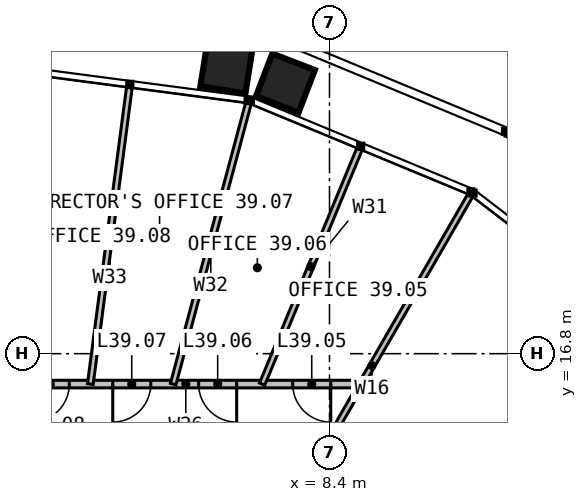
"""IFC4 building model, lengths in metres.
Left out: names, types, materials, properties, quantities, classifications, styles, units other than length and angle.
Written with IfcOpenShell. Run it as: python <this file> out.ifc"""

import sys

from ifc_helpers import new_model, si_unit, direction, frame, frame_2d, origin, place, context, subcontext, project, spatial, rectangle, extrude, element, fill, save


model = new_model("IFC4")
c1 = context("Model", 3, precision=1e-05, world=origin(), true_north=direction((0.0, 1.0)))
c2 = subcontext(c1, "Body", "Model", "MODEL_VIEW")
j1 = project(units=[si_unit("LENGTHUNIT", "METRE"), si_unit("PLANEANGLEUNIT", "RADIAN")], contexts=[c1])
p1 = place(None, origin())
s1 = spatial("IfcSite", under=j1, at=p1, CompositionType="ELEMENT")
p2 = place(p1, origin())
s2 = spatial("IfcBuilding", under=s1, at=p2, CompositionType="ELEMENT")
p3 = place(p2, frame((0.0, 0.0, 163.0)))
s3 = spatial("IfcBuildingStorey", under=s2, at=p3, CompositionType="ELEMENT", Elevation=163.0)
p4 = place(p3, frame((6.928, 12.0, 0.0), z_axis=(0.0, 0.0, 1.0), x_axis=(0.500006140648, 0.86602185845, 0.0)))
e1 = element("IfcWall", 1, at=p4, inside=s3, PredefinedType="PARTITIONING", context=c2, shape_type="SweptSolid", body=[
    extrude(rectangle(XDim=10.355, YDim=0.15, at=frame_2d((5.177, 0.0))), origin(), (0.0, 0.0, 1.0), 2.79),
])
p5 = place(p3, frame((9.238, 16.0, 0.0), z_axis=(0.0, 0.0, 1.0), x_axis=(-1.0, 0.0, 0.0)))
e2 = element("IfcWall", 2, at=p5, inside=s3, PredefinedType="PARTITIONING", context=c2, shape_type="SweptSolid", body=[
    extrude(rectangle(XDim=9.238, YDim=0.2, at=frame_2d((4.619, 0.0))), origin(), (0.0, 0.0, 1.0), 3.8),
])
p6 = place(p5, frame((0.805, 0.0, 0.0)))
e3 = element("IfcOpeningElement", 3, at=p6, cuts=e2, PredefinedType="OPENING", context=c2, shape_type="SweptSolid", body=[
    extrude(rectangle(XDim=1.0, YDim=2.2, at=frame_2d((0.5, 1.1))), frame((0.0, 0.11, 0.0), z_axis=(0.0, -1.0, 0.0), x_axis=(1.0, 0.0, 0.0)), (0.0, 0.0, 1.0), 0.22),
])
p7 = place(p5, frame((3.28, 0.0, 0.0)))
e4 = element("IfcOpeningElement", 4, at=p7, cuts=e2, PredefinedType="OPENING", context=c2, shape_type="SweptSolid", body=[
    extrude(rectangle(XDim=1.0, YDim=2.2, at=frame_2d((0.5, 1.1))), frame((0.0, 0.11, 0.0), z_axis=(0.0, -1.0, 0.0), x_axis=(1.0, 0.0, 0.0)), (0.0, 0.0, 1.0), 0.22),
])
p8 = place(p5, frame((5.541, 0.0, 0.0)))
e5 = element("IfcOpeningElement", 5, at=p8, cuts=e2, PredefinedType="OPENING", context=c2, shape_type="SweptSolid", body=[
    extrude(rectangle(XDim=1.0, YDim=2.2, at=frame_2d((0.5, 1.1))), frame((0.0, 0.11, 0.0), z_axis=(0.0, -1.0, 0.0), x_axis=(1.0, 0.0, 0.0)), (0.0, 0.0, 1.0), 0.22),
])
p9 = place(p5, frame((7.684, 0.0, 0.0)))
e6 = element("IfcOpeningElement", 6, at=p9, cuts=e2, PredefinedType="OPENING", context=c2, shape_type="SweptSolid", body=[
    extrude(rectangle(XDim=1.0, YDim=2.2, at=frame_2d((0.5, 1.1))), frame((0.0, 0.11, 0.0), z_axis=(0.0, -1.0, 0.0), x_axis=(1.0, 0.0, 0.0)), (0.0, 0.0, 1.0), 0.22),
])
p10 = place(p3, frame((6.627, 16.0, 0.0), z_axis=(0.0, 0.0, 1.0), x_axis=(0.382682891863, 0.923879756395, 0.0)))
e7 = element("IfcWall", 7, at=p10, inside=s3, PredefinedType="PARTITIONING", context=c2, shape_type="SweptSolid", body=[
    extrude(rectangle(XDim=6.686, YDim=0.15, at=frame_2d((3.343, 0.0))), origin(), (0.0, 0.0, 1.0), 2.79),
])
p11 = place(p3, frame((4.287, 16.0, 0.0), z_axis=(0.0, 0.0, 1.0), x_axis=(0.25883290061, 0.965922113611, 0.0)))
e8 = element("IfcWall", 8, at=p11, inside=s3, PredefinedType="PARTITIONING", context=c2, shape_type="SweptSolid", body=[
    extrude(rectangle(XDim=7.647, YDim=0.15, at=frame_2d((3.823, 0.0))), origin(), (0.0, 0.0, 1.0), 2.79),
])
p12 = place(p3, frame((2.106, 16.0, 0.0), z_axis=(0.0, 0.0, 1.0), x_axis=(0.130510712839, 0.99144689915, 0.0)))
e9 = element("IfcWall", 9, at=p12, inside=s3, PredefinedType="PARTITIONING", context=c2, shape_type="SweptSolid", body=[
    extrude(rectangle(XDim=7.866, YDim=0.15, at=frame_2d((3.933, 0.0))), origin(), (0.0, 0.0, 1.0), 2.79),
])
p13 = place(p6, origin())
e10 = element("IfcDoor", 10, at=p13, inside=s3, OperationType="SINGLE_SWING_LEFT", PredefinedType="DOOR", context=c2, shape_type="SweptSolid", body=[
    extrude(rectangle(XDim=1.0, YDim=2.2, at=frame_2d((0.5, 1.1))), frame((0.0, 0.025, 0.0), z_axis=(0.0, -1.0, 0.0), x_axis=(1.0, 0.0, 0.0)), (0.0, 0.0, 1.0), 0.05),
])
fill(e3, e10)
p14 = place(p7, origin())
e11 = element("IfcDoor", 11, at=p14, inside=s3, OperationType="SINGLE_SWING_LEFT", PredefinedType="DOOR", context=c2, shape_type="SweptSolid", body=[
    extrude(rectangle(XDim=1.0, YDim=2.2, at=frame_2d((0.5, 1.1))), frame((0.0, 0.025, 0.0), z_axis=(0.0, -1.0, 0.0), x_axis=(1.0, 0.0, 0.0)), (0.0, 0.0, 1.0), 0.05),
])
fill(e4, e11)
p15 = place(p8, origin())
e12 = element("IfcDoor", 12, at=p15, inside=s3, OperationType="SINGLE_SWING_RIGHT", PredefinedType="DOOR", context=c2, shape_type="SweptSolid", body=[
    extrude(rectangle(XDim=1.0, YDim=2.2, at=frame_2d((0.5, 1.1))), frame((0.0, 0.025, 0.0), z_axis=(0.0, -1.0, 0.0), x_axis=(1.0, 0.0, 0.0)), (0.0, 0.0, 1.0), 0.05),
])
fill(e5, e12)
p16 = place(p9, origin())
e13 = element("IfcDoor", 13, at=p16, inside=s3, OperationType="SINGLE_SWING_RIGHT", PredefinedType="DOOR", context=c2, shape_type="SweptSolid", body=[
    extrude(rectangle(XDim=1.0, YDim=2.2, at=frame_2d((0.5, 1.1))), frame((0.0, 0.025, 0.0), z_axis=(0.0, -1.0, 0.0), x_axis=(1.0, 0.0, 0.0)), (0.0, 0.0, 1.0), 0.05),
])
fill(e6, e13)
save(model, sys.argv[1])
